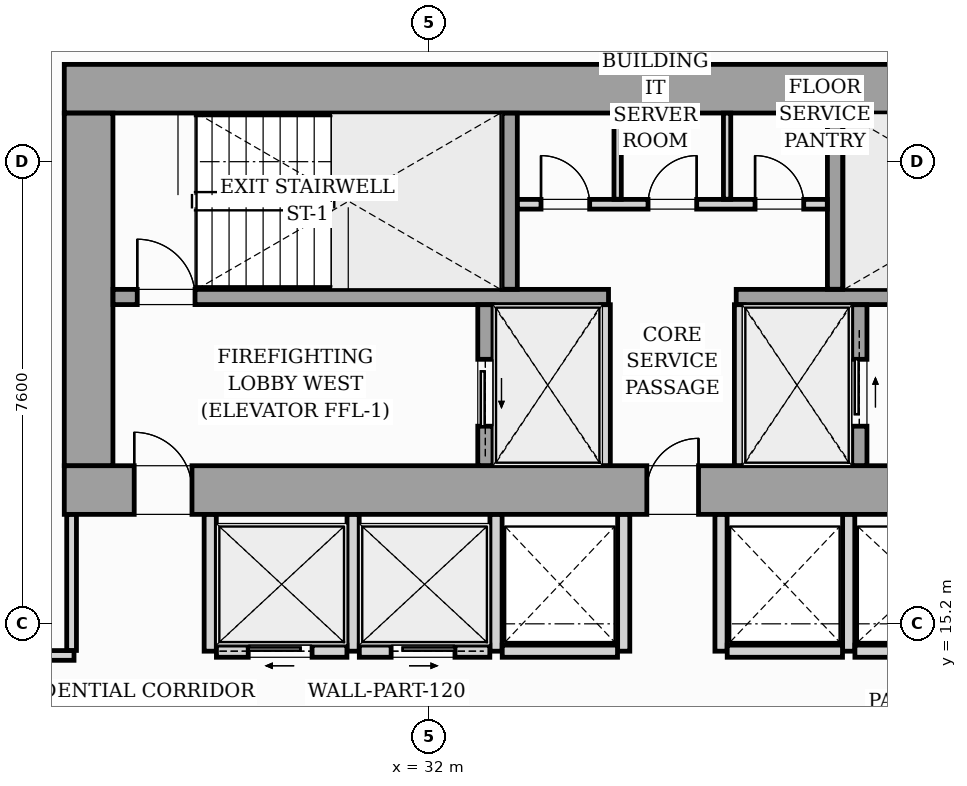
"""IFC4 building model, lengths in metres.
Left out: names, types, materials, properties, quantities, classifications, styles, units other than length and angle.
Written with IfcOpenShell. Run it as: python <this file> out.ifc"""

import sys

from ifc_helpers import new_model, si_unit, direction, frame, frame_2d, origin, origin_2d, place, context, subcontext, project, spatial, rectangle, i_section, extrude, source, transform, mapped, element, fill, save


model = new_model("IFC4")
c1 = context("Model", 3, precision=1e-05, world=origin(), true_north=direction((0.0, 1.0)))
c2 = subcontext(c1, "Body", "Model", "MODEL_VIEW")
j1 = project(units=[si_unit("LENGTHUNIT", "METRE"), si_unit("PLANEANGLEUNIT", "RADIAN")], contexts=[c1])
p1 = place(None, origin())
s1 = spatial("IfcSite", under=j1, at=p1, CompositionType="ELEMENT")
p2 = place(p1, origin())
s2 = spatial("IfcBuilding", under=s1, at=p2, CompositionType="ELEMENT")
p3 = place(p2, frame((0.0, 0.0, 55.0)))
s3 = spatial("IfcBuildingStorey", under=s2, at=p3, CompositionType="ELEMENT", Elevation=55.0)
m1 = source(origin(), c2, "Body", "SweptSolid", [
    extrude(i_section(OverallWidth=0.437, OverallDepth=0.514, WebThickness=0.061, FlangeThickness=0.097, FilletRadius=0.018, at=origin_2d()), origin(), (0.0, 0.0, 1.0), 3.196),
])
for number, where, z_axis, x_axis in (
    (1, (26.4, 17.4, 0.002), (0.0, 0.0, 1.0), (1.0, 0.0, 0.0)),
    (2, (33.12, 17.4, 0.002), (0.0, 0.0, 1.0), (1.0, 0.0, 0.0)),
    (3, (38.88, 17.4, 0.002), (0.0, 0.0, 1.0), (1.0, 0.0, 0.0)),
    (4, (26.4, 24.0, 0.002), (0.0, 0.0, 1.0), (1.0, 0.0, 0.0)),
    (5, (33.12, 24.0, 0.002), (0.0, 0.0, 1.0), (1.0, 0.0, 0.0)),
    (6, (38.88, 24.0, 0.002), (0.0, 0.0, 1.0), (1.0, 0.0, 0.0)),
):
    element("IfcColumn", number, at=place(p3, frame(where, z_axis=z_axis, x_axis=x_axis)), inside=s3, PredefinedType="PILASTER", context=c2, shape_type="MappedRepresentation", body=[
        mapped(m1, transform((0.0, 0.0, 0.0), scale=1.0)),
    ])
p4 = place(p3, frame((26.0, 17.4, 0.0), z_axis=(0.0, 0.0, 1.0), x_axis=(1.0, 0.0, 0.0)))
e7 = element("IfcWall", 7, at=p4, inside=s3, PredefinedType="SHEAR", context=c2, shape_type="SweptSolid", body=[
    extrude(rectangle(XDim=20.0, YDim=0.8, at=frame_2d((10.0, 0.0))), origin(), (0.0, 0.0, 1.0), 3.2),
])
p5 = place(p4, frame((1.15, 0.0, 0.0)))
e8 = element("IfcOpeningElement", 8, at=p5, cuts=e7, PredefinedType="OPENING", context=c2, shape_type="SweptSolid", body=[
    extrude(rectangle(XDim=0.95, YDim=2.06, at=frame_2d((0.475, 1.03))), frame((0.0, 0.41, 0.0), z_axis=(0.0, -1.0, 0.0), x_axis=(1.0, 0.0, 0.0)), (0.0, 0.0, 1.0), 0.82),
])
p6 = place(p4, frame((9.58, 0.0, 0.0)))
e9 = element("IfcOpeningElement", 9, at=p6, cuts=e7, PredefinedType="OPENING", context=c2, shape_type="SweptSolid", body=[
    extrude(rectangle(XDim=0.85, YDim=2.0, at=frame_2d((0.425, 1.0))), frame((0.0, 0.41, 0.0), z_axis=(0.0, -1.0, 0.0), x_axis=(1.0, 0.0, 0.0)), (0.0, 0.0, 1.0), 0.82),
])
p7 = place(p4, frame((17.75, 0.0, 0.0)))
e10 = element("IfcOpeningElement", 10, at=p7, cuts=e7, PredefinedType="OPENING", context=c2, shape_type="SweptSolid", body=[
    extrude(rectangle(XDim=0.95, YDim=2.06, at=frame_2d((0.475, 1.03))), frame((0.0, 0.41, 0.0), z_axis=(0.0, -1.0, 0.0), x_axis=(1.0, 0.0, 0.0)), (0.0, 0.0, 1.0), 0.82),
])
p8 = place(p3, frame((26.0, 24.0, 0.0), z_axis=(0.0, 0.0, 1.0), x_axis=(1.0, 0.0, 0.0)))
e11 = element("IfcWall", 11, at=p8, inside=s3, PredefinedType="SHEAR", context=c2, shape_type="SweptSolid", body=[
    extrude(rectangle(XDim=20.0, YDim=0.8, at=frame_2d((10.0, 0.0))), origin(), (0.0, 0.0, 1.0), 3.2),
])
p9 = place(p3, frame((26.4, 17.802, 0.0), z_axis=(0.0, 0.0, 1.0), x_axis=(0.0, 1.0, 0.0)))
e12 = element("IfcWall", 12, at=p9, inside=s3, PredefinedType="SHEAR", context=c2, shape_type="SweptSolid", body=[
    extrude(rectangle(XDim=5.796, YDim=0.8, at=frame_2d((2.898, 0.0))), origin(), (0.0, 0.0, 1.0), 3.2),
])
p10 = place(p3, frame((26.802, 20.575, 0.0), z_axis=(0.0, 0.0, 1.0), x_axis=(1.0, 0.0, 0.0)))
e13 = element("IfcWall", 13, at=p10, inside=s3, PredefinedType="SOLIDWALL", context=c2, shape_type="SweptSolid", body=[
    extrude(rectangle(XDim=8.148, YDim=0.25, at=frame_2d((4.074, 0.0))), origin(), (0.0, 0.0, 1.0), 3.2),
])
p11 = place(p10, frame((0.398, 0.0, 0.0)))
e14 = element("IfcOpeningElement", 14, at=p11, cuts=e13, PredefinedType="OPENING", context=c2, shape_type="SweptSolid", body=[
    extrude(rectangle(XDim=0.95, YDim=2.06, at=frame_2d((0.475, 1.03))), frame((0.0, 0.135, 0.0), z_axis=(0.0, -1.0, 0.0), x_axis=(1.0, 0.0, 0.0)), (0.0, 0.0, 1.0), 0.27),
])
p12 = place(p3, frame((37.05, 20.575, 0.0), z_axis=(0.0, 0.0, 1.0), x_axis=(1.0, 0.0, 0.0)))
e15 = element("IfcWall", 15, at=p12, inside=s3, PredefinedType="SOLIDWALL", context=c2, shape_type="SweptSolid", body=[
    extrude(rectangle(XDim=8.148, YDim=0.25, at=frame_2d((4.074, 0.0))), origin(), (0.0, 0.0, 1.0), 3.2),
])
p13 = place(p12, frame((6.6, 0.0, 0.0)))
e16 = element("IfcOpeningElement", 16, at=p13, cuts=e15, PredefinedType="OPENING", context=c2, shape_type="SweptSolid", body=[
    extrude(rectangle(XDim=0.95, YDim=2.06, at=frame_2d((0.475, 1.03))), frame((0.0, 0.135, 0.0), z_axis=(0.0, -1.0, 0.0), x_axis=(1.0, 0.0, 0.0)), (0.0, 0.0, 1.0), 0.27),
])
for number, where, z_axis, x_axis in (
    (17, (33.325, 20.702, 0.0), (0.0, 0.0, 1.0), (0.0, 1.0, 0.0)),
    (18, (38.675, 20.702, 0.0), (0.0, 0.0, 1.0), (0.0, 1.0, 0.0)),
):
    element("IfcWall", number, at=place(p3, frame(where, z_axis=z_axis, x_axis=x_axis)), inside=s3, PredefinedType="SOLIDWALL", context=c2, shape_type="SweptSolid", body=[
        extrude(rectangle(XDim=2.896, YDim=0.25, at=frame_2d((1.448, 0.0))), origin(), (0.0, 0.0, 1.0), 3.2),
    ])
p14 = place(p3, frame((32.925, 17.802, 0.0), z_axis=(0.0, 0.0, 1.0), x_axis=(0.0, 1.0, 0.0)))
e19 = element("IfcWall", 19, at=p14, inside=s3, PredefinedType="SOLIDWALL", context=c2, shape_type="SweptSolid", body=[
    extrude(rectangle(XDim=2.646, YDim=0.25, at=frame_2d((1.323, 0.0))), origin(), (0.0, 0.0, 1.0), 3.2),
])
p15 = place(p14, frame((0.648, 0.0, 0.0)))
e20 = element("IfcOpeningElement", 20, at=p15, cuts=e19, PredefinedType="OPENING", context=c2, shape_type="SweptSolid", body=[
    extrude(rectangle(XDim=1.1, YDim=2.08, at=frame_2d((0.55, 1.04))), frame((0.0, 0.135, 0.0), z_axis=(0.0, -1.0, 0.0), x_axis=(1.0, 0.0, 0.0)), (0.0, 0.0, 1.0), 0.27),
])
for number, where, z_axis, x_axis in (
    (21, (34.9, 17.802, 0.0), (0.0, 0.0, 1.0), (0.0, 1.0, 0.0)),
    (22, (37.1, 17.802, 0.0), (0.0, 0.0, 1.0), (0.0, 1.0, 0.0)),
):
    element("IfcWall", number, at=place(p3, frame(where, z_axis=z_axis, x_axis=x_axis)), inside=s3, PredefinedType="PARTITIONING", context=c2, shape_type="SweptSolid", body=[
        extrude(rectangle(XDim=2.646, YDim=0.16, at=frame_2d((1.323, 0.0))), origin(), (0.0, 0.0, 1.0), 2.94),
    ])
p16 = place(p3, frame((39.075, 17.802, 0.0), z_axis=(0.0, 0.0, 1.0), x_axis=(0.0, 1.0, 0.0)))
e23 = element("IfcWall", 23, at=p16, inside=s3, PredefinedType="SOLIDWALL", context=c2, shape_type="SweptSolid", body=[
    extrude(rectangle(XDim=2.646, YDim=0.25, at=frame_2d((1.323, 0.0))), origin(), (0.0, 0.0, 1.0), 3.2),
])
p17 = place(p16, frame((0.648, 0.0, 0.0)))
e24 = element("IfcOpeningElement", 24, at=p17, cuts=e23, PredefinedType="OPENING", context=c2, shape_type="SweptSolid", body=[
    extrude(rectangle(XDim=1.1, YDim=2.08, at=frame_2d((0.55, 1.04))), frame((0.0, 0.135, 0.0), z_axis=(0.0, -1.0, 0.0), x_axis=(1.0, 0.0, 0.0)), (0.0, 0.0, 1.0), 0.27),
])
p18 = place(p3, frame((33.452, 22.1, 0.0), z_axis=(0.0, 0.0, 1.0), x_axis=(1.0, 0.0, 0.0)))
e25 = element("IfcWall", 25, at=p18, inside=s3, PredefinedType="PARTITIONING", context=c2, shape_type="SweptSolid", body=[
    extrude(rectangle(XDim=5.096, YDim=0.16, at=frame_2d((2.548, 0.0))), origin(), (0.0, 0.0, 1.0), 2.94),
])
p19 = place(p18, frame((0.388, 0.0, 0.0)))
e26 = element("IfcOpeningElement", 26, at=p19, cuts=e25, PredefinedType="OPENING", context=c2, shape_type="SweptSolid", body=[
    extrude(rectangle(XDim=0.8, YDim=2.05, at=frame_2d((0.4, 1.025))), frame((0.0, 0.09, 0.0), z_axis=(0.0, -1.0, 0.0), x_axis=(1.0, 0.0, 0.0)), (0.0, 0.0, 1.0), 0.18),
])
p20 = place(p18, frame((2.148, 0.0, 0.0)))
e27 = element("IfcOpeningElement", 27, at=p20, cuts=e25, PredefinedType="OPENING", context=c2, shape_type="SweptSolid", body=[
    extrude(rectangle(XDim=0.8, YDim=2.05, at=frame_2d((0.4, 1.025))), frame((0.0, 0.09, 0.0), z_axis=(0.0, -1.0, 0.0), x_axis=(1.0, 0.0, 0.0)), (0.0, 0.0, 1.0), 0.18),
])
p21 = place(p18, frame((3.908, 0.0, 0.0)))
e28 = element("IfcOpeningElement", 28, at=p21, cuts=e25, PredefinedType="OPENING", context=c2, shape_type="SweptSolid", body=[
    extrude(rectangle(XDim=0.8, YDim=2.05, at=frame_2d((0.4, 1.025))), frame((0.0, 0.09, 0.0), z_axis=(0.0, -1.0, 0.0), x_axis=(1.0, 0.0, 0.0)), (0.0, 0.0, 1.0), 0.18),
])
for number, where, z_axis, x_axis in (
    (29, (35.1, 22.182, 0.0), (0.0, 0.0, 1.0), (0.0, 1.0, 0.0)),
    (30, (36.9, 22.182, 0.0), (0.0, 0.0, 1.0), (0.0, 1.0, 0.0)),
):
    element("IfcWall", number, at=place(p3, frame(where, z_axis=z_axis, x_axis=x_axis)), inside=s3, PredefinedType="PARTITIONING", context=c2, shape_type="SweptSolid", body=[
        extrude(rectangle(XDim=1.416, YDim=0.12, at=frame_2d((0.708, 0.0))), origin(), (0.0, 0.0, 1.0), 2.94),
    ])
for number, where, z_axis, x_axis in (
    (31, (28.4, 14.75, 0.0), (0.0, 0.0, 1.0), (0.0, 1.0, 0.0)),
    (32, (30.75, 14.75, 0.0), (0.0, 0.0, 1.0), (0.0, 1.0, 0.0)),
    (33, (33.1, 14.75, 0.0), (0.0, 0.0, 1.0), (0.0, 1.0, 0.0)),
):
    element("IfcWall", number, at=place(p3, frame(where, z_axis=z_axis, x_axis=x_axis)), inside=s3, PredefinedType="PARTITIONING", context=c2, shape_type="SweptSolid", body=[
        extrude(rectangle(XDim=2.248, YDim=0.2, at=frame_2d((1.124, 0.0))), origin(), (0.0, 0.0, 1.0), 2.94),
    ])
p22 = place(p3, frame((28.502, 14.75, 0.0), z_axis=(0.0, 0.0, 1.0), x_axis=(1.0, 0.0, 0.0)))
e34 = element("IfcWall", 34, at=p22, inside=s3, PredefinedType="PARTITIONING", context=c2, shape_type="SweptSolid", body=[
    extrude(rectangle(XDim=2.146, YDim=0.2, at=frame_2d((1.073, 0.0))), origin(), (0.0, 0.0, 1.0), 2.94),
])
p23 = place(p22, frame((0.523, 0.0, 0.0)))
e35 = element("IfcOpeningElement", 35, at=p23, cuts=e34, PredefinedType="OPENING", context=c2, shape_type="SweptSolid", body=[
    extrude(rectangle(XDim=1.05, YDim=2.08, at=frame_2d((0.525, 1.04))), frame((0.0, 0.11, 0.0), z_axis=(0.0, -1.0, 0.0), x_axis=(1.0, 0.0, 0.0)), (0.0, 0.0, 1.0), 0.22),
])
p24 = place(p3, frame((30.852, 14.75, 0.0), z_axis=(0.0, 0.0, 1.0), x_axis=(1.0, 0.0, 0.0)))
e36 = element("IfcWall", 36, at=p24, inside=s3, PredefinedType="PARTITIONING", context=c2, shape_type="SweptSolid", body=[
    extrude(rectangle(XDim=2.146, YDim=0.2, at=frame_2d((1.073, 0.0))), origin(), (0.0, 0.0, 1.0), 2.94),
])
p25 = place(p24, frame((0.523, 0.0, 0.0)))
e37 = element("IfcOpeningElement", 37, at=p25, cuts=e36, PredefinedType="OPENING", context=c2, shape_type="SweptSolid", body=[
    extrude(rectangle(XDim=1.05, YDim=2.08, at=frame_2d((0.525, 1.04))), frame((0.0, 0.11, 0.0), z_axis=(0.0, -1.0, 0.0), x_axis=(1.0, 0.0, 0.0)), (0.0, 0.0, 1.0), 0.22),
])
p26 = place(p3, frame((35.2, 14.75, 0.0), z_axis=(0.0, 0.0, 1.0), x_axis=(0.0, 1.0, 0.0)))
e38 = element("IfcWall", 38, at=p26, inside=s3, PredefinedType="PARTITIONING", context=c2, shape_type="SweptSolid", body=[
    extrude(rectangle(XDim=2.248, YDim=0.2, at=frame_2d((1.124, 0.0))), origin(), (0.0, 0.0, 1.0), 2.94),
])
p27 = place(p3, frame((33.202, 14.75, 0.0), z_axis=(0.0, 0.0, 1.0), x_axis=(1.0, 0.0, 0.0)))
e39 = element("IfcWall", 39, at=p27, inside=s3, PredefinedType="PARTITIONING", context=c2, shape_type="SweptSolid", body=[
    extrude(rectangle(XDim=1.896, YDim=0.2, at=frame_2d((0.948, 0.0))), origin(), (0.0, 0.0, 1.0), 2.94),
])
for number, where, z_axis, x_axis in (
    (40, (36.8, 14.75, 0.0), (0.0, 0.0, 1.0), (0.0, 1.0, 0.0)),
    (41, (38.9, 14.75, 0.0), (0.0, 0.0, 1.0), (0.0, 1.0, 0.0)),
):
    element("IfcWall", number, at=place(p3, frame(where, z_axis=z_axis, x_axis=x_axis)), inside=s3, PredefinedType="PARTITIONING", context=c2, shape_type="SweptSolid", body=[
        extrude(rectangle(XDim=2.248, YDim=0.2, at=frame_2d((1.124, 0.0))), origin(), (0.0, 0.0, 1.0), 2.94),
    ])
p28 = place(p3, frame((36.902, 14.75, 0.0), z_axis=(0.0, 0.0, 1.0), x_axis=(1.0, 0.0, 0.0)))
e42 = element("IfcWall", 42, at=p28, inside=s3, PredefinedType="PARTITIONING", context=c2, shape_type="SweptSolid", body=[
    extrude(rectangle(XDim=1.896, YDim=0.2, at=frame_2d((0.948, 0.0))), origin(), (0.0, 0.0, 1.0), 2.94),
])
p29 = place(p3, frame((39.002, 14.75, 0.0), z_axis=(0.0, 0.0, 1.0), x_axis=(1.0, 0.0, 0.0)))
e43 = element("IfcWall", 43, at=p29, inside=s3, PredefinedType="PARTITIONING", context=c2, shape_type="SweptSolid", body=[
    extrude(rectangle(XDim=2.146, YDim=0.2, at=frame_2d((1.073, 0.0))), origin(), (0.0, 0.0, 1.0), 2.94),
])
p30 = place(p3, frame((36.0, 24.402, 0.0), z_axis=(0.0, 0.0, 1.0), x_axis=(0.0, 1.0, 0.0)))
e44 = element("IfcWall", 44, at=p30, inside=s3, PredefinedType="PARTITIONING", context=c2, shape_type="SweptSolid", body=[
    extrude(rectangle(XDim=3.218, YDim=0.2, at=frame_2d((1.609, 0.0))), origin(), (0.0, 0.0, 1.0), 2.94),
])
p31 = place(p3, frame((16.382, 14.68, 0.0), z_axis=(0.0, 0.0, 1.0), x_axis=(1.0, 0.0, 0.0)))
e45 = element("IfcWall", 45, at=p31, inside=s3, PredefinedType="PARTITIONING", context=c2, shape_type="SweptSolid", body=[
    extrude(rectangle(XDim=9.778, YDim=0.16, at=frame_2d((4.889, 0.0))), origin(), (0.0, 0.0, 1.0), 2.94),
])
p32 = place(p31, frame((4.313, 0.0, 0.0)))
e46 = element("IfcOpeningElement", 46, at=p32, cuts=e45, PredefinedType="OPENING", context=c2, shape_type="SweptSolid", body=[
    extrude(rectangle(XDim=0.95, YDim=2.06, at=frame_2d((0.475, 1.03))), frame((0.0, 0.09, 0.0), z_axis=(0.0, -1.0, 0.0), x_axis=(1.0, 0.0, 0.0)), (0.0, 0.0, 1.0), 0.18),
])
p33 = place(p3, frame((26.12, 14.762, 0.0), z_axis=(0.0, 0.0, 1.0), x_axis=(0.0, 1.0, 0.0)))
e47 = element("IfcWall", 47, at=p33, inside=s3, PredefinedType="PARTITIONING", context=c2, shape_type="SweptSolid", body=[
    extrude(rectangle(XDim=2.236, YDim=0.16, at=frame_2d((1.118, 0.0))), origin(), (0.0, 0.0, 1.0), 2.94),
])
m2 = source(origin(), c2, "Body", "SweptSolid", [
    extrude(rectangle(XDim=0.95, YDim=2.06, at=frame_2d((0.475, 1.03))), frame((0.0, 0.025, 0.0), z_axis=(0.0, -1.0, 0.0), x_axis=(1.0, 0.0, 0.0)), (0.0, 0.0, 1.0), 0.05),
])
p34 = place(p5, origin())
e48 = element("IfcDoor", 48, at=p34, inside=s3, OperationType="SINGLE_SWING_LEFT", PredefinedType="DOOR", context=c2, shape_type="MappedRepresentation", body=[
    mapped(m2, transform((0.0, 0.0, 0.0), scale=1.0)),
])
fill(e8, e48)
m3 = source(origin(), c2, "Body", "SweptSolid", [
    extrude(rectangle(XDim=0.85, YDim=2.0, at=frame_2d((0.425, 1.0))), frame((0.0, 0.025, 0.0), z_axis=(0.0, -1.0, 0.0), x_axis=(1.0, 0.0, 0.0)), (0.0, 0.0, 1.0), 0.05),
])
p35 = place(p6, origin())
e49 = element("IfcDoor", 49, at=p35, inside=s3, OperationType="SINGLE_SWING_RIGHT", PredefinedType="DOOR", context=c2, shape_type="MappedRepresentation", body=[
    mapped(m3, transform((0.0, 0.0, 0.0), scale=1.0)),
])
fill(e9, e49)
p36 = place(p11, origin())
e50 = element("IfcDoor", 50, at=p36, inside=s3, OperationType="SINGLE_SWING_LEFT", PredefinedType="DOOR", context=c2, shape_type="MappedRepresentation", body=[
    mapped(m2, transform((0.0, 0.0, 0.0), scale=1.0)),
])
fill(e14, e50)
m4 = source(origin(), c2, "Body", "SweptSolid", [
    extrude(rectangle(XDim=1.1, YDim=2.08, at=frame_2d((0.55, 1.04))), frame((0.0, 0.025, 0.0), z_axis=(0.0, -1.0, 0.0), x_axis=(1.0, 0.0, 0.0)), (0.0, 0.0, 1.0), 0.05),
])
p37 = place(p15, origin())
e51 = element("IfcDoor", 51, at=p37, inside=s3, OperationType="SLIDING_TO_LEFT", PredefinedType="DOOR", context=c2, shape_type="MappedRepresentation", body=[
    mapped(m4, transform((0.0, 0.0, 0.0), scale=1.0)),
])
fill(e20, e51)
p38 = place(p17, origin())
e52 = element("IfcDoor", 52, at=p38, inside=s3, OperationType="SLIDING_TO_RIGHT", PredefinedType="DOOR", context=c2, shape_type="MappedRepresentation", body=[
    mapped(m4, transform((0.0, 0.0, 0.0), scale=1.0)),
])
fill(e24, e52)
m5 = source(origin(), c2, "Body", "SweptSolid", [
    extrude(rectangle(XDim=0.8, YDim=2.05, at=frame_2d((0.4, 1.025))), frame((0.0, 0.025, 0.0), z_axis=(0.0, -1.0, 0.0), x_axis=(1.0, 0.0, 0.0)), (0.0, 0.0, 1.0), 0.05),
])
p39 = place(p19, origin())
e53 = element("IfcDoor", 53, at=p39, inside=s3, OperationType="SINGLE_SWING_LEFT", PredefinedType="DOOR", context=c2, shape_type="MappedRepresentation", body=[
    mapped(m5, transform((0.0, 0.0, 0.0), scale=1.0)),
])
fill(e26, e53)
p40 = place(p20, origin())
e54 = element("IfcDoor", 54, at=p40, inside=s3, OperationType="SINGLE_SWING_RIGHT", PredefinedType="DOOR", context=c2, shape_type="MappedRepresentation", body=[
    mapped(m5, transform((0.0, 0.0, 0.0), scale=1.0)),
])
fill(e27, e54)
p41 = place(p21, origin())
e55 = element("IfcDoor", 55, at=p41, inside=s3, OperationType="SINGLE_SWING_LEFT", PredefinedType="DOOR", context=c2, shape_type="MappedRepresentation", body=[
    mapped(m5, transform((0.0, 0.0, 0.0), scale=1.0)),
])
fill(e28, e55)
m6 = source(origin(), c2, "Body", "SweptSolid", [
    extrude(rectangle(XDim=1.05, YDim=2.08, at=frame_2d((0.525, 1.04))), frame((0.0, 0.025, 0.0), z_axis=(0.0, -1.0, 0.0), x_axis=(1.0, 0.0, 0.0)), (0.0, 0.0, 1.0), 0.05),
])
p42 = place(p23, origin())
e56 = element("IfcDoor", 56, at=p42, inside=s3, OperationType="SLIDING_TO_LEFT", PredefinedType="DOOR", context=c2, shape_type="MappedRepresentation", body=[
    mapped(m6, transform((0.0, 0.0, 0.0), scale=1.0)),
])
fill(e35, e56)
p43 = place(p25, origin())
e57 = element("IfcDoor", 57, at=p43, inside=s3, OperationType="SLIDING_TO_RIGHT", PredefinedType="DOOR", context=c2, shape_type="MappedRepresentation", body=[
    mapped(m6, transform((0.0, 0.0, 0.0), scale=1.0)),
])
fill(e37, e57)
save(model, sys.argv[1])
